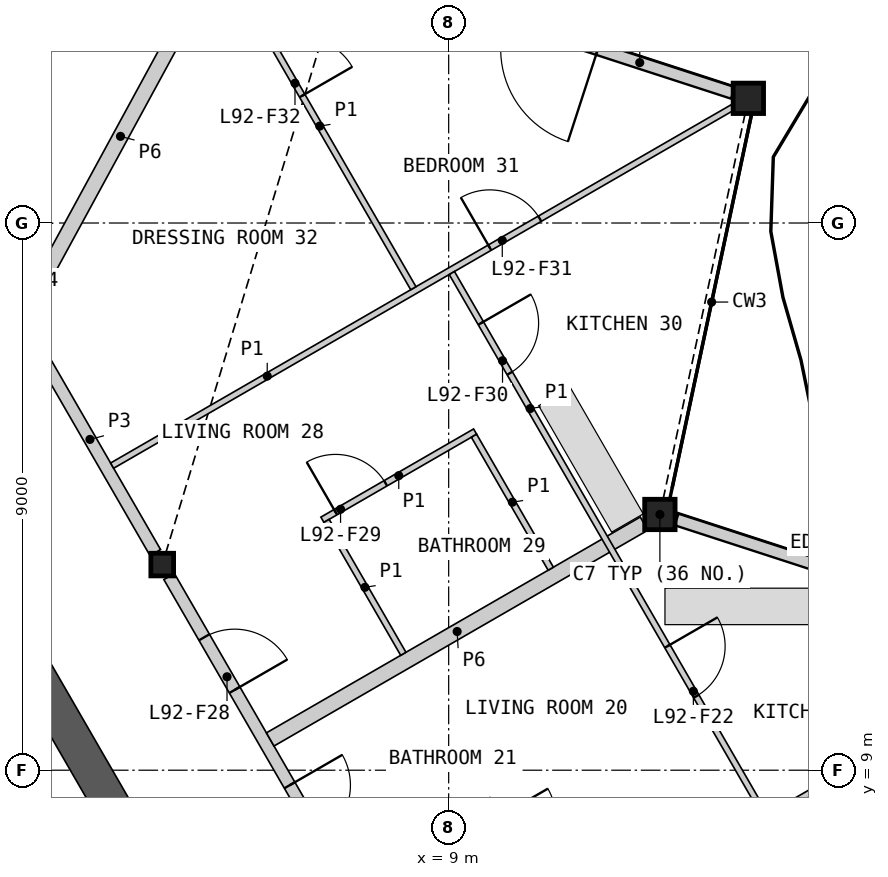
"""IFC4 building model, lengths in metres.
Left out: names, types, materials, properties, quantities, classifications, styles, units other than length and angle.
Written with IfcOpenShell. Run it as: python <this file> out.ifc"""

import sys

from ifc_helpers import new_model, si_unit, direction, frame, frame_2d, origin, origin_2d, place, context, subcontext, project, spatial, rectangle, hollow_rectangle, i_section, extrude, element, fill, save


model = new_model("IFC4")
c1 = context("Model", 3, precision=1e-05, world=origin(), true_north=direction((0.0, 1.0)))
c2 = subcontext(c1, "Body", "Model", "MODEL_VIEW")
j1 = project(units=[si_unit("LENGTHUNIT", "METRE"), si_unit("PLANEANGLEUNIT", "RADIAN")], contexts=[c1])
p1 = place(None, origin())
s1 = spatial("IfcSite", under=j1, at=p1, CompositionType="ELEMENT")
p2 = place(p1, origin())
s2 = spatial("IfcBuilding", under=s1, at=p2, CompositionType="ELEMENT")
p3 = place(p2, frame((0.0, 0.0, 401.8)))
s3 = spatial("IfcBuildingStorey", under=s2, at=p3, CompositionType="ELEMENT", Elevation=401.8)
for number, where, z_axis, x_axis in (
    (1, (12.474, 13.206, 0.0), (0.0, 0.0, 1.0), (1.0, 0.0, 0.0)),
    (2, (13.929, 20.051, 0.0), (0.0, 0.0, 1.0), (1.0, 0.0, 0.0)),
):
    element("IfcColumn", number, at=place(p3, frame(where, z_axis=z_axis, x_axis=x_axis)), inside=s3, PredefinedType="COLUMN", context=c2, shape_type="SweptSolid", body=[
        extrude(hollow_rectangle(XDim=0.5, YDim=0.5, WallThickness=0.03, at=origin_2d()), origin(), (0.0, 0.0, 1.0), 3.4),
    ])
p4 = place(p3, frame((4.289, 12.382, 0.0), z_axis=(0.0, 0.0, 1.0), x_axis=(1.0, 0.0, 0.0)))
e3 = element("IfcColumn", 3, at=p4, inside=s3, PredefinedType="COLUMN", context=c2, shape_type="SweptSolid", body=[
    extrude(i_section(OverallWidth=0.374, OverallDepth=0.372, WebThickness=0.016, FlangeThickness=0.026, at=origin_2d()), origin(), (0.0, 0.0, 1.0), 3.4),
])
p5 = place(p3, frame((18.874, 11.134, 0.0), z_axis=(0.0, 0.0, 1.0), x_axis=(-0.951063037463, 0.308996923563, 0.0)))
e4 = element("IfcWall", 4, at=p5, inside=s3, PredefinedType="SOLIDWALL", context=c2, shape_type="SweptSolid", body=[
    extrude(rectangle(XDim=6.44, YDim=0.2, at=frame_2d((3.22, 0.0))), origin(), (0.0, 0.0, 1.0), 2.634),
])
p6 = place(p5, frame((2.333, 0.0, 0.0)))
e5 = element("IfcOpeningElement", 5, at=p6, cuts=e4, PredefinedType="OPENING", context=c2, shape_type="SweptSolid", body=[
    extrude(rectangle(XDim=1.6, YDim=2.25, at=frame_2d((0.8, 1.125))), frame((0.0, 0.11, 0.0), z_axis=(0.0, -1.0, 0.0), x_axis=(1.0, 0.0, 0.0)), (0.0, 0.0, 1.0), 0.22),
])
p7 = place(p3, frame((13.674, 20.14, 0.0), z_axis=(0.0, 0.0, 1.0), x_axis=(-0.951051896423, 0.309031212518, 0.0)))
e6 = element("IfcWall", 6, at=p7, inside=s3, PredefinedType="SOLIDWALL", context=c2, shape_type="SweptSolid", body=[
    extrude(rectangle(XDim=6.44, YDim=0.2, at=frame_2d((3.22, 0.0))), origin(), (0.0, 0.0, 1.0), 2.634),
])
p8 = place(p7, frame((2.333, 0.0, 0.0)))
e7 = element("IfcOpeningElement", 7, at=p8, cuts=e6, PredefinedType="OPENING", context=c2, shape_type="SweptSolid", body=[
    extrude(rectangle(XDim=1.6, YDim=2.25, at=frame_2d((0.8, 1.125))), frame((0.0, 0.11, 0.0), z_axis=(0.0, -1.0, 0.0), x_axis=(1.0, 0.0, 0.0)), (0.0, 0.0, 1.0), 0.22),
])
p9 = place(p3, frame((8.686, -0.634, 0.0), z_axis=(0.0, 0.0, 1.0), x_axis=(-0.500004601921, 0.866022746848, 0.0)))
e8 = element("IfcWall", 8, at=p9, inside=s3, PredefinedType="SHEAR", context=c2, shape_type="SweptSolid", body=[
    extrude(rectangle(XDim=16.853, YDim=0.6, at=frame_2d((8.426, 0.0))), origin(), (0.0, 0.0, 1.0), 3.1),
])
p10 = place(p3, frame((1.903, 16.301, 0.0), z_axis=(0.0, 0.0, 1.0), x_axis=(0.47791275145, 0.878407309852, 0.0)))
e9 = element("IfcWall", 9, at=p10, inside=s3, PredefinedType="PARTITIONING", context=c2, shape_type="SweptSolid", body=[
    extrude(rectangle(XDim=14.226, YDim=0.25, at=frame_2d((7.113, 0.0))), origin(), (0.0, 0.0, 1.0), 2.33),
])
p11 = place(p3, frame((4.403, 12.185, 0.0), z_axis=(0.0, 0.0, 1.0), x_axis=(0.499992155518, -0.866029932751, 0.0)))
e10 = element("IfcWall", 10, at=p11, inside=s3, PredefinedType="PARTITIONING", context=c2, shape_type="SweptSolid", body=[
    extrude(rectangle(XDim=8.123, YDim=0.2, at=frame_2d((4.062, 0.0))), origin(), (0.0, 0.0, 1.0), 3.1),
])
p12 = place(p11, frame((3.963, 0.0, 0.0)))
e11 = element("IfcOpeningElement", 11, at=p12, cuts=e10, PredefinedType="OPENING", context=c2, shape_type="SweptSolid", body=[
    extrude(rectangle(XDim=1.0, YDim=2.1, at=frame_2d((0.5, 1.05))), frame((0.0, 0.11, 0.0), z_axis=(0.0, -1.0, 0.0), x_axis=(1.0, 0.0, 0.0)), (0.0, 0.0, 1.0), 0.22),
])
p13 = place(p11, frame((1.153, 0.0, 0.0)))
e12 = element("IfcOpeningElement", 12, at=p13, cuts=e10, PredefinedType="OPENING", context=c2, shape_type="SweptSolid", body=[
    extrude(rectangle(XDim=1.0, YDim=2.1, at=frame_2d((0.5, 1.05))), frame((0.0, 0.11, 0.0), z_axis=(0.0, -1.0, 0.0), x_axis=(1.0, 0.0, 0.0)), (0.0, 0.0, 1.0), 0.22),
])
p14 = place(p3, frame((6.065, 9.506, 0.0), z_axis=(0.0, 0.0, 1.0), x_axis=(0.866018949465, 0.500011179042, 0.0)))
e13 = element("IfcWall", 13, at=p14, inside=s3, PredefinedType="PARTITIONING", context=c2, shape_type="SweptSolid", body=[
    extrude(rectangle(XDim=7.1, YDim=0.25, at=frame_2d((3.55, 0.0))), origin(), (0.0, 0.0, 1.0), 2.33),
])
p15 = place(p3, frame((2.025, 16.303, 0.0), z_axis=(0.0, 0.0, 1.0), x_axis=(0.500004215162, -0.866022970146, 0.0)))
e14 = element("IfcWall", 14, at=p15, inside=s3, PredefinedType="PARTITIONING", context=c2, shape_type="SweptSolid", body=[
    extrude(rectangle(XDim=4.3, YDim=0.2, at=frame_2d((2.15, 0.0))), origin(), (0.0, 0.0, 1.0), 3.1),
])
p16 = place(p3, frame((3.465, 14.01, 0.0), z_axis=(0.0, 0.0, 1.0), x_axis=(0.866032376801, 0.499987922186, 0.0)))
e15 = element("IfcWall", 15, at=p16, inside=s3, PredefinedType="PARTITIONING", context=c2, shape_type="SweptSolid", body=[
    extrude(rectangle(XDim=11.782, YDim=0.1, at=frame_2d((5.891, 0.0))), origin(), (0.0, 0.0, 1.0), 2.33),
])
p17 = place(p16, frame((7.171, 0.0, 0.0)))
e16 = element("IfcOpeningElement", 16, at=p17, cuts=e15, PredefinedType="OPENING", context=c2, shape_type="SweptSolid", body=[
    extrude(rectangle(XDim=0.95, YDim=2.1, at=frame_2d((0.475, 1.05))), frame((0.0, 0.06, 0.0), z_axis=(0.0, -1.0, 0.0), x_axis=(1.0, 0.0, 0.0)), (0.0, 0.0, 1.0), 0.12),
])
p18 = place(p3, frame((8.775, 5.066, 0.0), z_axis=(0.0, 0.0, 1.0), x_axis=(0.866023724155, 0.500002909193, 0.0)))
e17 = element("IfcWall", 17, at=p18, inside=s3, PredefinedType="PARTITIONING", context=c2, shape_type="SweptSolid", body=[
    extrude(rectangle(XDim=11.655, YDim=0.1, at=frame_2d((5.827, 0.0))), origin(), (0.0, 0.0, 1.0), 2.33),
])
p19 = place(p18, frame((4.252, 0.0, 0.0)))
e18 = element("IfcOpeningElement", 18, at=p19, cuts=e17, PredefinedType="OPENING", context=c2, shape_type="SweptSolid", body=[
    extrude(rectangle(XDim=0.95, YDim=2.1, at=frame_2d((0.475, 1.05))), frame((0.0, 0.06, 0.0), z_axis=(0.0, -1.0, 0.0), x_axis=(1.0, 0.0, 0.0)), (0.0, 0.0, 1.0), 0.12),
])
p20 = place(p3, frame((9.052, 17.177, 0.0), z_axis=(0.0, 0.0, 1.0), x_axis=(0.499998765615, -0.866026116456, 0.0)))
e19 = element("IfcWall", 19, at=p20, inside=s3, PredefinedType="PARTITIONING", context=c2, shape_type="SweptSolid", body=[
    extrude(rectangle(XDim=10.3, YDim=0.1, at=frame_2d((5.15, 0.0))), origin(), (0.0, 0.0, 1.0), 2.33),
])
p21 = place(p20, frame((7.089, 0.0, 0.0)))
e20 = element("IfcOpeningElement", 20, at=p21, cuts=e19, PredefinedType="OPENING", context=c2, shape_type="SweptSolid", body=[
    extrude(rectangle(XDim=0.95, YDim=2.1, at=frame_2d((0.475, 1.05))), frame((0.0, 0.06, 0.0), z_axis=(0.0, -1.0, 0.0), x_axis=(1.0, 0.0, 0.0)), (0.0, 0.0, 1.0), 0.12),
])
p22 = place(p20, frame((0.954, 0.0, 0.0)))
e21 = element("IfcOpeningElement", 21, at=p22, cuts=e19, PredefinedType="OPENING", context=c2, shape_type="SweptSolid", body=[
    extrude(rectangle(XDim=0.95, YDim=2.1, at=frame_2d((0.475, 1.05))), frame((0.0, 0.06, 0.0), z_axis=(0.0, -1.0, 0.0), x_axis=(1.0, 0.0, 0.0)), (0.0, 0.0, 1.0), 0.12),
])
p23 = place(p3, frame((5.34, 22.26, 0.0), z_axis=(0.0, 0.0, 1.0), x_axis=(0.500027893485, -0.866009298874, 0.0)))
e22 = element("IfcWall", 22, at=p23, inside=s3, PredefinedType="PARTITIONING", context=c2, shape_type="SweptSolid", body=[
    extrude(rectangle(XDim=6.158, YDim=0.1, at=frame_2d((3.079, 0.0))), origin(), (0.0, 0.0, 1.0), 2.33),
])
p24 = place(p23, frame((1.552, 0.0, 0.0)))
e23 = element("IfcOpeningElement", 23, at=p24, cuts=e22, PredefinedType="OPENING", context=c2, shape_type="SweptSolid", body=[
    extrude(rectangle(XDim=0.95, YDim=2.1, at=frame_2d((0.475, 1.05))), frame((0.0, 0.06, 0.0), z_axis=(0.0, -1.0, 0.0), x_axis=(1.0, 0.0, 0.0)), (0.0, 0.0, 1.0), 0.12),
])
p25 = place(p3, frame((6.923, 13.119, 0.0), z_axis=(0.0, 0.0, 1.0), x_axis=(0.866032775405, 0.499987231761, 0.0)))
e24 = element("IfcWall", 24, at=p25, inside=s3, PredefinedType="PARTITIONING", context=c2, shape_type="SweptSolid", body=[
    extrude(rectangle(XDim=2.9, YDim=0.1, at=frame_2d((1.45, 0.0))), origin(), (0.0, 0.0, 1.0), 2.33),
])
p26 = place(p25, frame((0.25, 0.0, 0.0)))
e25 = element("IfcOpeningElement", 25, at=p26, cuts=e24, PredefinedType="OPENING", context=c2, shape_type="SweptSolid", body=[
    extrude(rectangle(XDim=0.95, YDim=2.1, at=frame_2d((0.475, 1.05))), frame((0.0, 0.06, 0.0), z_axis=(0.0, -1.0, 0.0), x_axis=(1.0, 0.0, 0.0)), (0.0, 0.0, 1.0), 0.12),
])
p27 = place(p3, frame((9.417, 14.501, 0.0), z_axis=(0.0, 0.0, 1.0), x_axis=(0.500048846702, -0.865997200291, 0.0)))
e26 = element("IfcWall", 26, at=p27, inside=s3, PredefinedType="PARTITIONING", context=c2, shape_type="SweptSolid", body=[
    extrude(rectangle(XDim=2.525, YDim=0.1, at=frame_2d((1.263, 0.0))), origin(), (0.0, 0.0, 1.0), 2.33),
])
p28 = place(p3, frame((6.992, 13.101, 0.0), z_axis=(0.0, 0.0, 1.0), x_axis=(0.499976333282, -0.866039067339, 0.0)))
e27 = element("IfcWall", 27, at=p28, inside=s3, PredefinedType="PARTITIONING", context=c2, shape_type="SweptSolid", body=[
    extrude(rectangle(XDim=2.525, YDim=0.1, at=frame_2d((1.262, 0.0))), origin(), (0.0, 0.0, 1.0), 2.33),
])
p29 = place(p12, origin())
e28 = element("IfcDoor", 28, at=p29, inside=s3, OperationType="SINGLE_SWING_LEFT", PredefinedType="DOOR", context=c2, shape_type="SweptSolid", body=[
    extrude(rectangle(XDim=1.0, YDim=2.1, at=frame_2d((0.5, 1.05))), frame((0.0, 0.025, 0.0), z_axis=(0.0, -1.0, 0.0), x_axis=(1.0, 0.0, 0.0)), (0.0, 0.0, 1.0), 0.05),
])
fill(e11, e28)
p30 = place(p21, origin())
e29 = element("IfcDoor", 29, at=p30, inside=s3, OperationType="SINGLE_SWING_LEFT", PredefinedType="DOOR", context=c2, shape_type="SweptSolid", body=[
    extrude(rectangle(XDim=0.95, YDim=2.1, at=frame_2d((0.475, 1.05))), frame((0.0, 0.025, 0.0), z_axis=(0.0, -1.0, 0.0), x_axis=(1.0, 0.0, 0.0)), (0.0, 0.0, 1.0), 0.05),
])
fill(e20, e29)
p31 = place(p13, origin())
e30 = element("IfcDoor", 30, at=p31, inside=s3, OperationType="SINGLE_SWING_RIGHT", PredefinedType="DOOR", context=c2, shape_type="SweptSolid", body=[
    extrude(rectangle(XDim=1.0, YDim=2.1, at=frame_2d((0.5, 1.05))), frame((0.0, 0.025, 0.0), z_axis=(0.0, -1.0, 0.0), x_axis=(1.0, 0.0, 0.0)), (0.0, 0.0, 1.0), 0.05),
])
fill(e12, e30)
p32 = place(p26, origin())
e31 = element("IfcDoor", 31, at=p32, inside=s3, OperationType="SINGLE_SWING_LEFT", PredefinedType="DOOR", context=c2, shape_type="SweptSolid", body=[
    extrude(rectangle(XDim=0.95, YDim=2.1, at=frame_2d((0.475, 1.05))), frame((0.0, 0.025, 0.0), z_axis=(0.0, -1.0, 0.0), x_axis=(1.0, 0.0, 0.0)), (0.0, 0.0, 1.0), 0.05),
])
fill(e25, e31)
p33 = place(p22, origin())
e32 = element("IfcDoor", 32, at=p33, inside=s3, OperationType="SINGLE_SWING_LEFT", PredefinedType="DOOR", context=c2, shape_type="SweptSolid", body=[
    extrude(rectangle(XDim=0.95, YDim=2.1, at=frame_2d((0.475, 1.05))), frame((0.0, 0.025, 0.0), z_axis=(0.0, -1.0, 0.0), x_axis=(1.0, 0.0, 0.0)), (0.0, 0.0, 1.0), 0.05),
])
fill(e21, e32)
p34 = place(p17, origin())
e33 = element("IfcDoor", 33, at=p34, inside=s3, OperationType="SINGLE_SWING_LEFT", PredefinedType="DOOR", context=c2, shape_type="SweptSolid", body=[
    extrude(rectangle(XDim=0.95, YDim=2.1, at=frame_2d((0.475, 1.05))), frame((0.0, 0.025, 0.0), z_axis=(0.0, -1.0, 0.0), x_axis=(1.0, 0.0, 0.0)), (0.0, 0.0, 1.0), 0.05),
])
fill(e16, e33)
p35 = place(p24, origin())
e34 = element("IfcDoor", 34, at=p35, inside=s3, OperationType="SINGLE_SWING_RIGHT", PredefinedType="DOOR", context=c2, shape_type="SweptSolid", body=[
    extrude(rectangle(XDim=0.95, YDim=2.1, at=frame_2d((0.475, 1.05))), frame((0.0, 0.025, 0.0), z_axis=(0.0, -1.0, 0.0), x_axis=(1.0, 0.0, 0.0)), (0.0, 0.0, 1.0), 0.05),
])
fill(e23, e34)
save(model, sys.argv[1])
